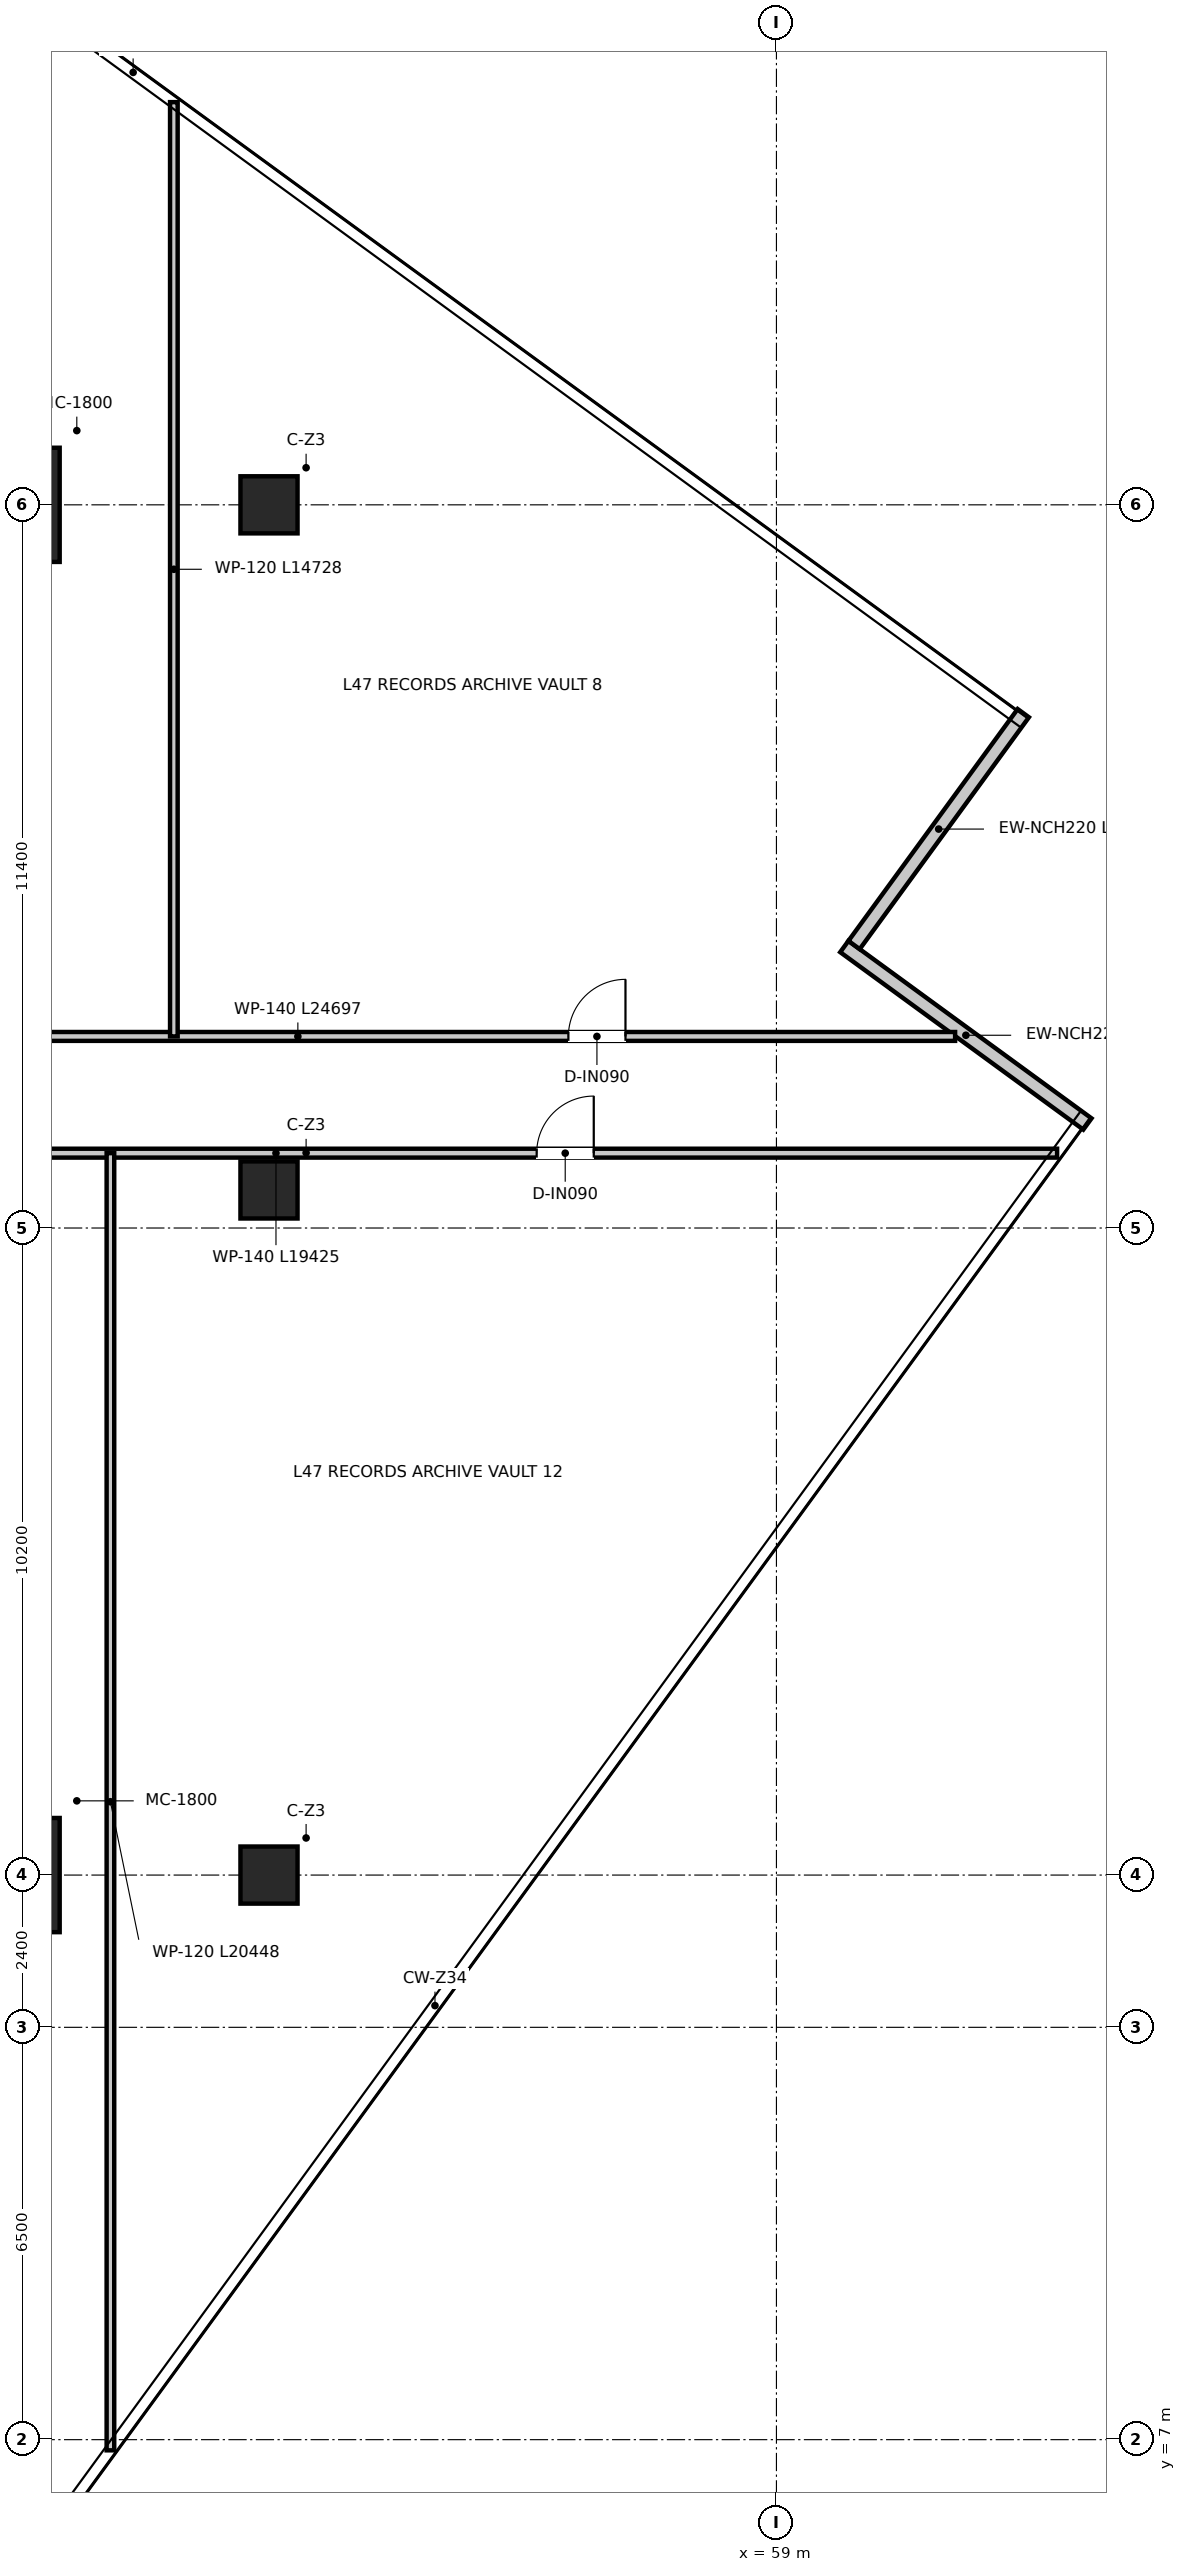
"""IFC4 building model, lengths in metres.
Left out: names, types, materials, properties, quantities, classifications, styles, units other than length and angle.
Written with IfcOpenShell. Run it as: python <this file> out.ifc"""

import sys

from ifc_helpers import new_model, si_unit, direction, frame, frame_2d, origin, origin_2d, place, context, subcontext, project, spatial, rectangle, extrude, source, transform, mapped, element, fill, save


model = new_model("IFC4")
c1 = context("Model", 3, precision=1e-05, world=origin(), true_north=direction((0.0, 1.0)))
c2 = subcontext(c1, "Body", "Model", "MODEL_VIEW")
j1 = project(units=[si_unit("LENGTHUNIT", "METRE"), si_unit("PLANEANGLEUNIT", "RADIAN")], contexts=[c1])
p1 = place(None, origin())
s1 = spatial("IfcSite", under=j1, at=p1, CompositionType="ELEMENT")
p2 = place(p1, origin())
s2 = spatial("IfcBuilding", under=s1, at=p2, CompositionType="ELEMENT")
p3 = place(p2, frame((0.0, 0.0, 193.6)))
s3 = spatial("IfcBuildingStorey", under=s2, at=p3, CompositionType="ELEMENT", Elevation=193.6)
m1 = source(origin(), c2, "Body", "SweptSolid", [
    extrude(rectangle(XDim=1.8, YDim=1.8, at=origin_2d()), origin(), (0.0, 0.0, 1.0), 3.95),
])
for number, where, z_axis, x_axis in (
    (1, (46.8, 15.9, 0.0), (0.0, 0.0, 1.0), (1.0, 0.0, 0.0)),
    (2, (46.8, 37.5, 0.0), (0.0, 0.0, 1.0), (1.0, 0.0, 0.0)),
):
    element("IfcColumn", number, at=place(p3, frame(where, z_axis=z_axis, x_axis=x_axis)), inside=s3, PredefinedType="USERDEFINED", context=c2, shape_type="MappedRepresentation", body=[
        mapped(m1, transform((0.0, 0.0, 0.0), x_axis=(1.0, 0.0, 0.0), y_axis=(0.0, 1.0, 0.0), z_axis=(0.0, 0.0, 1.0), scale=1.0)),
    ])
m2 = source(origin(), c2, "Body", "SweptSolid", [
    extrude(rectangle(XDim=0.9, YDim=0.9, at=origin_2d()), origin(), (0.0, 0.0, 1.0), 3.95),
])
for number, where, z_axis, x_axis in (
    (3, (51.0, 37.5, 0.0), (0.0, 0.0, 1.0), (1.0, 0.0, 0.0)),
    (4, (51.0, 26.7, 0.0), (0.0, 0.0, 1.0), (1.0, 0.0, 0.0)),
    (5, (51.0, 15.9, 0.0), (0.0, 0.0, 1.0), (1.0, 0.0, 0.0)),
):
    element("IfcColumn", number, at=place(p3, frame(where, z_axis=z_axis, x_axis=x_axis)), inside=s3, PredefinedType="COLUMN", context=c2, shape_type="MappedRepresentation", body=[
        mapped(m2, transform((0.0, 0.0, 0.0), x_axis=(1.0, 0.0, 0.0), y_axis=(0.0, 1.0, 0.0), z_axis=(0.0, 0.0, 1.0), scale=1.0)),
    ])
p4 = place(p3, frame((63.903, 27.74, 0.0), z_axis=(0.0, 0.0, 1.0), x_axis=(-0.807718106916, 0.58956887618, 0.0)))
e6 = element("IfcWall", 6, at=p4, inside=s3, PredefinedType="ELEMENTEDWALL", context=c2, shape_type="SweptSolid", body=[
    extrude(rectangle(XDim=4.745, YDim=0.22, at=frame_2d((2.373, 0.0))), origin(), (0.0, 0.0, 1.0), 3.67),
])
p5 = place(p3, frame((60.224, 30.561, 0.0), z_axis=(0.0, 0.0, 1.0), x_axis=(0.589547091209, 0.807734007732, 0.0)))
e7 = element("IfcWall", 7, at=p5, inside=s3, PredefinedType="ELEMENTEDWALL", context=c2, shape_type="SweptSolid", body=[
    extrude(rectangle(XDim=4.525, YDim=0.22, at=frame_2d((2.263, 0.0))), origin(), (0.0, 0.0, 1.0), 3.67),
])
p6 = place(p3, frame((37.12, 29.12, 0.0), z_axis=(0.0, 0.0, 1.0), x_axis=(1.0, 0.0, 0.0)))
e8 = element("IfcWall", 8, at=p6, inside=s3, PredefinedType="PARTITIONING", context=c2, shape_type="SweptSolid", body=[
    extrude(rectangle(XDim=24.697, YDim=0.14, at=frame_2d((12.348, 0.0))), origin(), (0.0, 0.0, 1.0), 3.03),
])
p7 = place(p6, frame((3.03, 0.0, 0.0)))
e9 = element("IfcOpeningElement", 9, at=p7, cuts=e8, PredefinedType="OPENING", context=c2, shape_type="SweptSolid", body=[
    extrude(rectangle(XDim=0.9, YDim=2.1, at=frame_2d((0.45, 1.05))), frame((0.0, 0.08, 0.0), z_axis=(0.0, -1.0, 0.0), x_axis=(1.0, 0.0, 0.0)), (0.0, 0.0, 1.0), 0.16),
])
p8 = place(p6, frame((9.17, 0.0, 0.0)))
e10 = element("IfcOpeningElement", 10, at=p8, cuts=e8, PredefinedType="OPENING", context=c2, shape_type="SweptSolid", body=[
    extrude(rectangle(XDim=0.9, YDim=2.1, at=frame_2d((0.45, 1.05))), frame((0.0, 0.08, 0.0), z_axis=(0.0, -1.0, 0.0), x_axis=(1.0, 0.0, 0.0)), (0.0, 0.0, 1.0), 0.16),
])
p9 = place(p6, frame((18.6, 0.0, 0.0)))
e11 = element("IfcOpeningElement", 11, at=p9, cuts=e8, PredefinedType="OPENING", context=c2, shape_type="SweptSolid", body=[
    extrude(rectangle(XDim=0.9, YDim=2.1, at=frame_2d((0.45, 1.05))), frame((0.0, 0.08, 0.0), z_axis=(0.0, -1.0, 0.0), x_axis=(1.0, 0.0, 0.0)), (0.0, 0.0, 1.0), 0.16),
])
p10 = place(p3, frame((44.0, 27.28, 0.0), z_axis=(0.0, 0.0, 1.0), x_axis=(1.0, 0.0, 0.0)))
e12 = element("IfcWall", 12, at=p10, inside=s3, PredefinedType="PARTITIONING", context=c2, shape_type="SweptSolid", body=[
    extrude(rectangle(XDim=19.425, YDim=0.14, at=frame_2d((9.712, 0.0))), origin(), (0.0, 0.0, 1.0), 3.03),
])
p11 = place(p10, frame((2.1, 0.0, 0.0)))
e13 = element("IfcOpeningElement", 13, at=p11, cuts=e12, PredefinedType="OPENING", context=c2, shape_type="SweptSolid", body=[
    extrude(rectangle(XDim=0.9, YDim=2.1, at=frame_2d((0.45, 1.05))), frame((0.0, 0.08, 0.0), z_axis=(0.0, -1.0, 0.0), x_axis=(1.0, 0.0, 0.0)), (0.0, 0.0, 1.0), 0.16),
])
p12 = place(p10, frame((11.22, 0.0, 0.0)))
e14 = element("IfcOpeningElement", 14, at=p12, cuts=e12, PredefinedType="OPENING", context=c2, shape_type="SweptSolid", body=[
    extrude(rectangle(XDim=0.9, YDim=2.1, at=frame_2d((0.45, 1.05))), frame((0.0, 0.08, 0.0), z_axis=(0.0, -1.0, 0.0), x_axis=(1.0, 0.0, 0.0)), (0.0, 0.0, 1.0), 0.16),
])
p13 = place(p3, frame((49.5, 29.12, 0.0), z_axis=(0.0, 0.0, 1.0), x_axis=(0.0, 1.0, 0.0)))
e15 = element("IfcWall", 15, at=p13, inside=s3, PredefinedType="PARTITIONING", context=c2, shape_type="SweptSolid", body=[
    extrude(rectangle(XDim=14.728, YDim=0.12, at=frame_2d((7.364, 0.0))), origin(), (0.0, 0.0, 1.0), 3.08),
])
p14 = place(p3, frame((48.5, 6.832, 0.0), z_axis=(0.0, 0.0, 1.0), x_axis=(0.0, 1.0, 0.0)))
e16 = element("IfcWall", 16, at=p14, inside=s3, PredefinedType="PARTITIONING", context=c2, shape_type="SweptSolid", body=[
    extrude(rectangle(XDim=20.448, YDim=0.12, at=frame_2d((10.224, 0.0))), origin(), (0.0, 0.0, 1.0), 3.08),
])
p15 = place(p9, origin())
e17 = element("IfcDoor", 17, at=p15, inside=s3, OperationType="SINGLE_SWING_RIGHT", PredefinedType="DOOR", context=c2, shape_type="SweptSolid", body=[
    extrude(rectangle(XDim=0.9, YDim=2.1, at=frame_2d((0.45, 1.05))), frame((0.0, 0.025, 0.0), z_axis=(0.0, -1.0, 0.0), x_axis=(1.0, 0.0, 0.0)), (0.0, 0.0, 1.0), 0.05),
])
fill(e11, e17)
p16 = place(p12, origin())
e18 = element("IfcDoor", 18, at=p16, inside=s3, OperationType="SINGLE_SWING_RIGHT", PredefinedType="DOOR", context=c2, shape_type="SweptSolid", body=[
    extrude(rectangle(XDim=0.9, YDim=2.1, at=frame_2d((0.45, 1.05))), frame((0.0, 0.025, 0.0), z_axis=(0.0, -1.0, 0.0), x_axis=(1.0, 0.0, 0.0)), (0.0, 0.0, 1.0), 0.05),
])
fill(e14, e18)
save(model, sys.argv[1])
